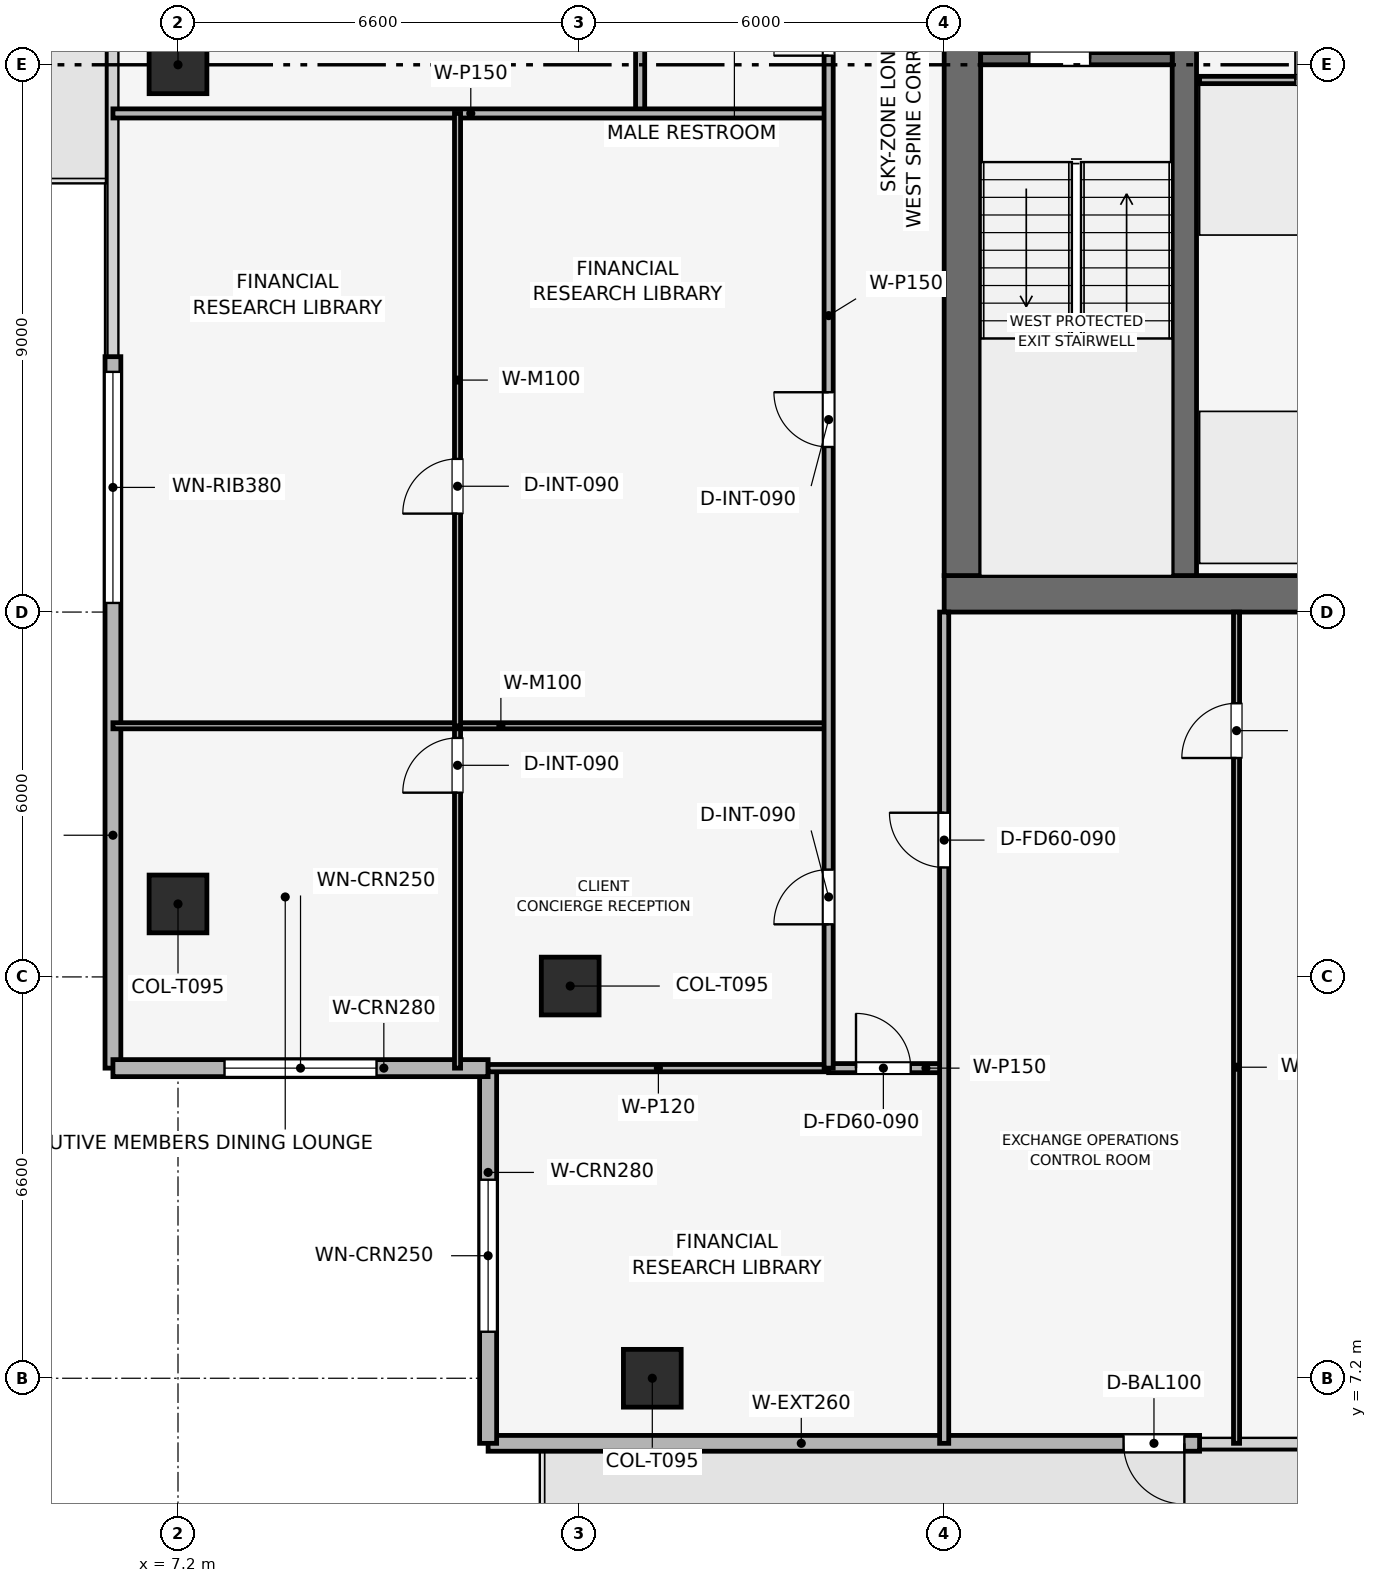
"""IFC4 building model, lengths in metres.
Left out: names, types, materials, properties, quantities, classifications, styles, units other than length and angle.
Written with IfcOpenShell. Run it as: python <this file> out.ifc"""

import sys

from ifc_helpers import new_model, si_unit, direction, frame, frame_2d, origin, origin_2d, place, context, subcontext, project, spatial, rectangle, extrude, element, fill, save


model = new_model("IFC4")
c1 = context("Model", 3, precision=1e-05, world=origin(), true_north=direction((0.0, 1.0)))
c2 = subcontext(c1, "Body", "Model", "MODEL_VIEW")
j1 = project(units=[si_unit("LENGTHUNIT", "METRE"), si_unit("PLANEANGLEUNIT", "RADIAN")], contexts=[c1])
p1 = place(None, origin())
s1 = spatial("IfcSite", under=j1, at=p1, CompositionType="ELEMENT")
p2 = place(p1, origin())
s2 = spatial("IfcBuilding", under=s1, at=p2, CompositionType="ELEMENT")
p3 = place(p2, frame((0.0, 0.0, 314.25)))
s3 = spatial("IfcBuildingStorey", under=s2, at=p3, CompositionType="ELEMENT", Elevation=314.25)
p4 = place(p3, frame((19.8, 20.1, 0.0), z_axis=(0.0, 0.0, 1.0), x_axis=(1.0, 0.0, 0.0)))
e1 = element("IfcWall", 1, at=p4, inside=s3, PredefinedType="SHEAR", context=c2, shape_type="SweptSolid", body=[
    extrude(rectangle(XDim=18.0, YDim=0.6, at=frame_2d((9.0, 0.0))), origin(), (0.0, 0.0, 1.0), 3.75),
])
p5 = place(p3, frame((20.1, 20.4, 0.0), z_axis=(0.0, 0.0, 1.0), x_axis=(0.0, 1.0, 0.0)))
e2 = element("IfcWall", 2, at=p5, inside=s3, PredefinedType="SHEAR", context=c2, shape_type="SweptSolid", body=[
    extrude(rectangle(XDim=16.8, YDim=0.6, at=frame_2d((8.4, 0.0))), origin(), (0.0, 0.0, 1.0), 3.75),
])
p6 = place(p5, frame((10.4, 0.0, 0.0)))
e3 = element("IfcOpeningElement", 3, at=p6, cuts=e2, PredefinedType="OPENING", context=c2, shape_type="SweptSolid", body=[
    extrude(rectangle(XDim=1.1, YDim=2.15, at=frame_2d((0.55, 1.075))), frame((0.0, 0.31, 0.0), z_axis=(0.0, -1.0, 0.0), x_axis=(1.0, 0.0, 0.0)), (0.0, 0.0, 1.0), 0.62),
])
p7 = place(p3, frame((23.75, 20.4, 0.0), z_axis=(0.0, 0.0, 1.0), x_axis=(0.0, 1.0, 0.0)))
e4 = element("IfcWall", 4, at=p7, inside=s3, PredefinedType="SHEAR", context=c2, shape_type="SweptSolid", body=[
    extrude(rectangle(XDim=16.8, YDim=0.4, at=frame_2d((8.4, 0.0))), origin(), (0.0, 0.0, 1.0), 3.75),
])
for number, where, z_axis, x_axis in (
    (5, (15.0, 7.2, 0.003), (0.0, 0.0, 1.0), (1.0, 0.0, 0.0)),
    (6, (7.2, 28.8, 0.003), (0.0, 0.0, 1.0), (1.0, 0.0, 0.0)),
    (7, (7.2, 15.0, 0.003), (0.0, 0.0, 1.0), (1.0, 0.0, 0.0)),
    (8, (13.65, 13.65, 0.003), (0.0, 0.0, 1.0), (1.0, 0.0, 0.0)),
):
    element("IfcColumn", number, at=place(p3, frame(where, z_axis=z_axis, x_axis=x_axis)), inside=s3, PredefinedType="COLUMN", context=c2, shape_type="SweptSolid", body=[
        extrude(rectangle(XDim=0.95, YDim=0.95, at=origin_2d()), origin(), (0.0, 0.0, 1.0), 3.504),
    ])
p8 = place(p3, frame((24.0, 6.13, 0.0), z_axis=(0.0, 0.0, 1.0), x_axis=(-1.0, 0.0, 0.0)))
e9 = element("IfcWall", 9, at=p8, inside=s3, PredefinedType="SOLIDWALL", context=c2, shape_type="SweptSolid", body=[
    extrude(rectangle(XDim=11.7, YDim=0.26, at=frame_2d((5.85, 0.0))), origin(), (0.0, 0.0, 1.0), 3.51),
])
p9 = place(p8, frame((0.25, 0.0, 0.0)))
e10 = element("IfcOpeningElement", 10, at=p9, cuts=e9, PredefinedType="OPENING", context=c2, shape_type="SweptSolid", body=[
    extrude(rectangle(XDim=1.0, YDim=2.2, at=frame_2d((0.5, 1.1))), frame((0.0, 0.14, 0.0), z_axis=(0.0, -1.0, 0.0), x_axis=(1.0, 0.0, 0.0)), (0.0, 0.0, 1.0), 0.28),
])
p10 = place(p3, frame((6.13, 12.3, 0.0), z_axis=(0.0, 0.0, 1.0), x_axis=(0.0, 1.0, 0.0)))
e11 = element("IfcWall", 11, at=p10, inside=s3, PredefinedType="SOLIDWALL", context=c2, shape_type="SweptSolid", body=[
    extrude(rectangle(XDim=11.7, YDim=0.26, at=frame_2d((5.85, 0.0))), origin(), (0.0, 0.0, 1.0), 3.51),
])
p11 = place(p10, frame((7.65, 0.0, 0.9)))
e12 = element("IfcOpeningElement", 12, at=p11, cuts=e11, PredefinedType="OPENING", context=c2, shape_type="SweptSolid", body=[
    extrude(rectangle(XDim=3.8, YDim=1.9, at=frame_2d((1.9, 0.95))), frame((0.0, 0.14, 0.0), z_axis=(0.0, -1.0, 0.0), x_axis=(1.0, 0.0, 0.0)), (0.0, 0.0, 1.0), 0.28),
])
p12 = place(p3, frame((12.3, 6.13, 0.0), z_axis=(0.0, 0.0, 1.0), x_axis=(0.0, 1.0, 0.0)))
e13 = element("IfcWall", 13, at=p12, inside=s3, PredefinedType="SOLIDWALL", context=c2, shape_type="SweptSolid", body=[
    extrude(rectangle(XDim=6.17, YDim=0.28, at=frame_2d((3.085, 0.0))), origin(), (0.0, 0.0, 1.0), 3.51),
])
p13 = place(p12, frame((1.835, 0.0, 0.9)))
e14 = element("IfcOpeningElement", 14, at=p13, cuts=e13, PredefinedType="OPENING", context=c2, shape_type="SweptSolid", body=[
    extrude(rectangle(XDim=2.5, YDim=1.9, at=frame_2d((1.25, 0.95))), frame((0.0, 0.15, 0.0), z_axis=(0.0, -1.0, 0.0), x_axis=(1.0, 0.0, 0.0)), (0.0, 0.0, 1.0), 0.3),
])
p14 = place(p3, frame((12.3, 12.3, 0.0), z_axis=(0.0, 0.0, 1.0), x_axis=(-1.0, 0.0, 0.0)))
e15 = element("IfcWall", 15, at=p14, inside=s3, PredefinedType="SOLIDWALL", context=c2, shape_type="SweptSolid", body=[
    extrude(rectangle(XDim=6.17, YDim=0.28, at=frame_2d((3.085, 0.0))), origin(), (0.0, 0.0, 1.0), 3.51),
])
p15 = place(p14, frame((1.835, 0.0, 0.9)))
e16 = element("IfcOpeningElement", 16, at=p15, cuts=e15, PredefinedType="OPENING", context=c2, shape_type="SweptSolid", body=[
    extrude(rectangle(XDim=2.5, YDim=1.9, at=frame_2d((1.25, 0.95))), frame((0.0, 0.15, 0.0), z_axis=(0.0, -1.0, 0.0), x_axis=(1.0, 0.0, 0.0)), (0.0, 0.0, 1.0), 0.3),
])
p16 = place(p3, frame((20.4, 28.9, 0.0), z_axis=(0.0, 0.0, 1.0), x_axis=(1.0, 0.0, 0.0)))
e17 = element("IfcWall", 17, at=p16, inside=s3, PredefinedType="SHEAR", context=c2, shape_type="SweptSolid", body=[
    extrude(rectangle(XDim=3.15, YDim=0.2, at=frame_2d((1.575, 0.0))), origin(), (0.0, 0.0, 1.0), 3.51),
])
p17 = place(p16, frame((0.8, 0.0, 0.0)))
e18 = element("IfcOpeningElement", 18, at=p17, cuts=e17, PredefinedType="OPENING", context=c2, shape_type="SweptSolid", body=[
    extrude(rectangle(XDim=1.0, YDim=2.1, at=frame_2d((0.5, 1.05))), frame((0.0, 0.11, 0.0), z_axis=(0.0, -1.0, 0.0), x_axis=(1.0, 0.0, 0.0)), (0.0, 0.0, 1.0), 0.22),
])
p18 = place(p3, frame((24.0, 28.55, 0.0), z_axis=(0.0, 0.0, 1.0), x_axis=(1.0, 0.0, 0.0)))
e19 = element("IfcWall", 19, at=p18, inside=s3, PredefinedType="PARTITIONING", context=c2, shape_type="SweptSolid", body=[
    extrude(rectangle(XDim=4.05, YDim=0.12, at=frame_2d((2.025, 0.0))), origin(), (0.0, 0.0, 1.0), 3.51),
])
p19 = place(p18, frame((1.575, 0.0, 0.0)))
e20 = element("IfcOpeningElement", 20, at=p19, cuts=e19, PredefinedType="OPENING", context=c2, shape_type="SweptSolid", body=[
    extrude(rectangle(XDim=0.9, YDim=2.1, at=frame_2d((0.45, 1.05))), frame((0.0, 0.07, 0.0), z_axis=(0.0, -1.0, 0.0), x_axis=(1.0, 0.0, 0.0)), (0.0, 0.0, 1.0), 0.14),
])
p20 = place(p3, frame((14.8, 28.0, 0.0), z_axis=(0.0, 0.0, 1.0), x_axis=(0.0, 1.0, 0.0)))
e21 = element("IfcWall", 21, at=p20, inside=s3, PredefinedType="PARTITIONING", context=c2, shape_type="SweptSolid", body=[
    extrude(rectangle(XDim=11.7, YDim=0.15, at=frame_2d((5.85, 0.0))), origin(), (0.0, 0.0, 1.0), 3.095),
])
p21 = place(p20, frame((9.6, 0.0, 0.0)))
e22 = element("IfcOpeningElement", 22, at=p21, cuts=e21, PredefinedType="OPENING", context=c2, shape_type="SweptSolid", body=[
    extrude(rectangle(XDim=0.9, YDim=2.1, at=frame_2d((0.45, 1.05))), frame((0.0, 0.085, 0.0), z_axis=(0.0, -1.0, 0.0), x_axis=(1.0, 0.0, 0.0)), (0.0, 0.0, 1.0), 0.17),
])
p22 = place(p3, frame((6.13, 28.0, 0.0), z_axis=(0.0, 0.0, 1.0), x_axis=(1.0, 0.0, 0.0)))
e23 = element("IfcWall", 23, at=p22, inside=s3, PredefinedType="PARTITIONING", context=c2, shape_type="SweptSolid", body=[
    extrude(rectangle(XDim=11.77, YDim=0.15, at=frame_2d((5.885, 0.0))), origin(), (0.0, 0.0, 1.0), 3.135),
])
p23 = place(p3, frame((11.797, 12.3, 0.0), z_axis=(0.0, 0.0, 1.0), x_axis=(0.0, 1.0, 0.0)))
e24 = element("IfcWall", 24, at=p23, inside=s3, PredefinedType="MOVABLE", context=c2, shape_type="SweptSolid", body=[
    extrude(rectangle(XDim=5.63, YDim=0.1, at=frame_2d((2.815, 0.0))), origin(), (0.0, 0.0, 1.0), 3.195),
])
p24 = place(p23, frame((4.53, 0.0, 0.0)))
e25 = element("IfcOpeningElement", 25, at=p24, cuts=e24, PredefinedType="OPENING", context=c2, shape_type="SweptSolid", body=[
    extrude(rectangle(XDim=0.9, YDim=2.1, at=frame_2d((0.45, 1.05))), frame((0.0, 0.06, 0.0), z_axis=(0.0, -1.0, 0.0), x_axis=(1.0, 0.0, 0.0)), (0.0, 0.0, 1.0), 0.12),
])
p25 = place(p3, frame((6.13, 17.93, 0.0), z_axis=(0.0, 0.0, 1.0), x_axis=(1.0, 0.0, 0.0)))
e26 = element("IfcWall", 26, at=p25, inside=s3, PredefinedType="MOVABLE", context=c2, shape_type="SweptSolid", body=[
    extrude(rectangle(XDim=11.77, YDim=0.1, at=frame_2d((5.885, 0.0))), origin(), (0.0, 0.0, 1.0), 3.095),
])
p26 = place(p3, frame((11.797, 17.93, 0.0), z_axis=(0.0, 0.0, 1.0), x_axis=(0.0, 1.0, 0.0)))
e27 = element("IfcWall", 27, at=p26, inside=s3, PredefinedType="MOVABLE", context=c2, shape_type="SweptSolid", body=[
    extrude(rectangle(XDim=10.07, YDim=0.1, at=frame_2d((5.035, 0.0))), origin(), (0.0, 0.0, 1.0), 3.095),
])
p27 = place(p26, frame((3.489, 0.0, 0.0)))
e28 = element("IfcOpeningElement", 28, at=p27, cuts=e27, PredefinedType="OPENING", context=c2, shape_type="SweptSolid", body=[
    extrude(rectangle(XDim=0.9, YDim=2.1, at=frame_2d((0.45, 1.05))), frame((0.0, 0.06, 0.0), z_axis=(0.0, -1.0, 0.0), x_axis=(1.0, 0.0, 0.0)), (0.0, 0.0, 1.0), 0.12),
])
p28 = place(p3, frame((12.3, 12.3, 0.0), z_axis=(0.0, 0.0, 1.0), x_axis=(1.0, 0.0, 0.0)))
e29 = element("IfcWall", 29, at=p28, inside=s3, PredefinedType="PARTITIONING", context=c2, shape_type="SweptSolid", body=[
    extrude(rectangle(XDim=5.6, YDim=0.12, at=frame_2d((2.8, 0.0))), origin(), (0.0, 0.0, 1.0), 3.195),
])
p29 = place(p3, frame((17.9, 12.3, 0.0), z_axis=(0.0, 0.0, 1.0), x_axis=(1.0, 0.0, 0.0)))
e30 = element("IfcWall", 30, at=p29, inside=s3, PredefinedType="PARTITIONING", context=c2, shape_type="SweptSolid", body=[
    extrude(rectangle(XDim=1.9, YDim=0.15, at=frame_2d((0.95, 0.0))), origin(), (0.0, 0.0, 1.0), 3.51),
])
p30 = place(p29, frame((0.45, 0.0, 0.0)))
e31 = element("IfcOpeningElement", 31, at=p30, cuts=e30, PredefinedType="OPENING", context=c2, shape_type="SweptSolid", body=[
    extrude(rectangle(XDim=0.9, YDim=2.1, at=frame_2d((0.45, 1.05))), frame((0.0, 0.085, 0.0), z_axis=(0.0, -1.0, 0.0), x_axis=(1.0, 0.0, 0.0)), (0.0, 0.0, 1.0), 0.17),
])
p31 = place(p3, frame((19.8, 6.13, 0.0), z_axis=(0.0, 0.0, 1.0), x_axis=(0.0, 1.0, 0.0)))
e32 = element("IfcWall", 32, at=p31, inside=s3, PredefinedType="PARTITIONING", context=c2, shape_type="SweptSolid", body=[
    extrude(rectangle(XDim=13.67, YDim=0.15, at=frame_2d((6.835, 0.0))), origin(), (0.0, 0.0, 1.0), 3.095),
])
p32 = place(p31, frame((9.47, 0.0, 0.0)))
e33 = element("IfcOpeningElement", 33, at=p32, cuts=e32, PredefinedType="OPENING", context=c2, shape_type="SweptSolid", body=[
    extrude(rectangle(XDim=0.9, YDim=2.1, at=frame_2d((0.45, 1.05))), frame((0.0, 0.085, 0.0), z_axis=(0.0, -1.0, 0.0), x_axis=(1.0, 0.0, 0.0)), (0.0, 0.0, 1.0), 0.17),
])
p33 = place(p3, frame((24.608, 6.13, 0.0), z_axis=(0.0, 0.0, 1.0), x_axis=(0.0, 1.0, 0.0)))
e34 = element("IfcWall", 34, at=p33, inside=s3, PredefinedType="MOVABLE", context=c2, shape_type="SweptSolid", body=[
    extrude(rectangle(XDim=13.67, YDim=0.1, at=frame_2d((6.835, 0.0))), origin(), (0.0, 0.0, 1.0), 3.135),
])
p34 = place(p33, frame((11.27, 0.0, 0.0)))
e35 = element("IfcOpeningElement", 35, at=p34, cuts=e34, PredefinedType="OPENING", context=c2, shape_type="SweptSolid", body=[
    extrude(rectangle(XDim=0.9, YDim=2.1, at=frame_2d((0.45, 1.05))), frame((0.0, 0.06, 0.0), z_axis=(0.0, -1.0, 0.0), x_axis=(1.0, 0.0, 0.0)), (0.0, 0.0, 1.0), 0.12),
])
p35 = place(p3, frame((17.9, 12.3, 0.0), z_axis=(0.0, 0.0, 1.0), x_axis=(0.0, 1.0, 0.0)))
e36 = element("IfcWall", 36, at=p35, inside=s3, PredefinedType="PARTITIONING", context=c2, shape_type="SweptSolid", body=[
    extrude(rectangle(XDim=27.4, YDim=0.15, at=frame_2d((13.7, 0.0))), origin(), (0.0, 0.0, 1.0), 3.095),
])
p36 = place(p35, frame((2.365, 0.0, 0.0)))
e37 = element("IfcOpeningElement", 37, at=p36, cuts=e36, PredefinedType="OPENING", context=c2, shape_type="SweptSolid", body=[
    extrude(rectangle(XDim=0.9, YDim=2.1, at=frame_2d((0.45, 1.05))), frame((0.0, 0.085, 0.0), z_axis=(0.0, -1.0, 0.0), x_axis=(1.0, 0.0, 0.0)), (0.0, 0.0, 1.0), 0.17),
])
p37 = place(p35, frame((10.215, 0.0, 0.0)))
e38 = element("IfcOpeningElement", 38, at=p37, cuts=e36, PredefinedType="OPENING", context=c2, shape_type="SweptSolid", body=[
    extrude(rectangle(XDim=0.9, YDim=2.1, at=frame_2d((0.45, 1.05))), frame((0.0, 0.085, 0.0), z_axis=(0.0, -1.0, 0.0), x_axis=(1.0, 0.0, 0.0)), (0.0, 0.0, 1.0), 0.17),
])
p38 = place(p35, frame((16.65, 0.0, 0.0)))
e39 = element("IfcOpeningElement", 39, at=p38, cuts=e36, PredefinedType="OPENING", context=c2, shape_type="SweptSolid", body=[
    extrude(rectangle(XDim=0.9, YDim=2.1, at=frame_2d((0.45, 1.05))), frame((0.0, 0.085, 0.0), z_axis=(0.0, -1.0, 0.0), x_axis=(1.0, 0.0, 0.0)), (0.0, 0.0, 1.0), 0.17),
])
p39 = place(p35, frame((19.55, 0.0, 0.0)))
e40 = element("IfcOpeningElement", 40, at=p39, cuts=e36, PredefinedType="OPENING", context=c2, shape_type="SweptSolid", body=[
    extrude(rectangle(XDim=0.9, YDim=2.1, at=frame_2d((0.45, 1.05))), frame((0.0, 0.085, 0.0), z_axis=(0.0, -1.0, 0.0), x_axis=(1.0, 0.0, 0.0)), (0.0, 0.0, 1.0), 0.17),
])
p40 = place(p35, frame((22.3, 0.0, 0.0)))
e41 = element("IfcOpeningElement", 41, at=p40, cuts=e36, PredefinedType="OPENING", context=c2, shape_type="SweptSolid", body=[
    extrude(rectangle(XDim=0.95, YDim=2.1, at=frame_2d((0.475, 1.05))), frame((0.0, 0.085, 0.0), z_axis=(0.0, -1.0, 0.0), x_axis=(1.0, 0.0, 0.0)), (0.0, 0.0, 1.0), 0.17),
])
p41 = place(p35, frame((25.3, 0.0, 0.0)))
e42 = element("IfcOpeningElement", 42, at=p41, cuts=e36, PredefinedType="OPENING", context=c2, shape_type="SweptSolid", body=[
    extrude(rectangle(XDim=0.9, YDim=2.1, at=frame_2d((0.45, 1.05))), frame((0.0, 0.085, 0.0), z_axis=(0.0, -1.0, 0.0), x_axis=(1.0, 0.0, 0.0)), (0.0, 0.0, 1.0), 0.17),
])
p42 = place(p9, origin())
e43 = element("IfcDoor", 43, at=p42, inside=s3, OperationType="SINGLE_SWING_LEFT", PredefinedType="DOOR", context=c2, shape_type="SweptSolid", body=[
    extrude(rectangle(XDim=1.0, YDim=2.2, at=frame_2d((0.5, 1.1))), frame((0.0, 0.025, 0.0), z_axis=(0.0, -1.0, 0.0), x_axis=(1.0, 0.0, 0.0)), (0.0, 0.0, 1.0), 0.05),
])
fill(e10, e43)
p43 = place(p11, origin())
e44 = element("IfcWindow", 44, at=p43, inside=s3, PartitioningType="SINGLE_PANEL", PredefinedType="WINDOW", context=c2, shape_type="SweptSolid", body=[
    extrude(rectangle(XDim=3.8, YDim=1.9, at=frame_2d((1.9, 0.95))), frame((0.0, 0.03, 0.0), z_axis=(0.0, -1.0, 0.0), x_axis=(1.0, 0.0, 0.0)), (0.0, 0.0, 1.0), 0.06),
])
fill(e12, e44)
p44 = place(p13, origin())
e45 = element("IfcWindow", 45, at=p44, inside=s3, PartitioningType="SINGLE_PANEL", PredefinedType="WINDOW", context=c2, shape_type="SweptSolid", body=[
    extrude(rectangle(XDim=2.5, YDim=1.9, at=frame_2d((1.25, 0.95))), frame((0.0, 0.03, 0.0), z_axis=(0.0, -1.0, 0.0), x_axis=(1.0, 0.0, 0.0)), (0.0, 0.0, 1.0), 0.06),
])
fill(e14, e45)
p45 = place(p15, origin())
e46 = element("IfcWindow", 46, at=p45, inside=s3, PartitioningType="SINGLE_PANEL", PredefinedType="WINDOW", context=c2, shape_type="SweptSolid", body=[
    extrude(rectangle(XDim=2.5, YDim=1.9, at=frame_2d((1.25, 0.95))), frame((0.0, 0.03, 0.0), z_axis=(0.0, -1.0, 0.0), x_axis=(1.0, 0.0, 0.0)), (0.0, 0.0, 1.0), 0.06),
])
fill(e16, e46)
p46 = place(p17, origin())
e47 = element("IfcDoor", 47, at=p46, inside=s3, OperationType="SINGLE_SWING_RIGHT", PredefinedType="DOOR", context=c2, shape_type="SweptSolid", body=[
    extrude(rectangle(XDim=1.0, YDim=2.1, at=frame_2d((0.5, 1.05))), frame((0.0, 0.025, 0.0), z_axis=(0.0, -1.0, 0.0), x_axis=(1.0, 0.0, 0.0)), (0.0, 0.0, 1.0), 0.05),
])
fill(e18, e47)
p47 = place(p19, origin())
e48 = element("IfcDoor", 48, at=p47, inside=s3, OperationType="SINGLE_SWING_LEFT", PredefinedType="DOOR", context=c2, shape_type="SweptSolid", body=[
    extrude(rectangle(XDim=0.9, YDim=2.1, at=frame_2d((0.45, 1.05))), frame((0.0, 0.025, 0.0), z_axis=(0.0, -1.0, 0.0), x_axis=(1.0, 0.0, 0.0)), (0.0, 0.0, 1.0), 0.05),
])
fill(e20, e48)
p48 = place(p24, origin())
e49 = element("IfcDoor", 49, at=p48, inside=s3, OperationType="SINGLE_SWING_LEFT", PredefinedType="DOOR", context=c2, shape_type="SweptSolid", body=[
    extrude(rectangle(XDim=0.9, YDim=2.1, at=frame_2d((0.45, 1.05))), frame((0.0, 0.025, 0.0), z_axis=(0.0, -1.0, 0.0), x_axis=(1.0, 0.0, 0.0)), (0.0, 0.0, 1.0), 0.05),
])
fill(e25, e49)
p49 = place(p27, origin())
e50 = element("IfcDoor", 50, at=p49, inside=s3, OperationType="SINGLE_SWING_LEFT", PredefinedType="DOOR", context=c2, shape_type="SweptSolid", body=[
    extrude(rectangle(XDim=0.9, YDim=2.1, at=frame_2d((0.45, 1.05))), frame((0.0, 0.025, 0.0), z_axis=(0.0, -1.0, 0.0), x_axis=(1.0, 0.0, 0.0)), (0.0, 0.0, 1.0), 0.05),
])
fill(e28, e50)
p50 = place(p30, origin())
e51 = element("IfcDoor", 51, at=p50, inside=s3, OperationType="SINGLE_SWING_LEFT", PredefinedType="DOOR", context=c2, shape_type="SweptSolid", body=[
    extrude(rectangle(XDim=0.9, YDim=2.1, at=frame_2d((0.45, 1.05))), frame((0.0, 0.025, 0.0), z_axis=(0.0, -1.0, 0.0), x_axis=(1.0, 0.0, 0.0)), (0.0, 0.0, 1.0), 0.05),
])
fill(e31, e51)
p51 = place(p32, origin())
e52 = element("IfcDoor", 52, at=p51, inside=s3, OperationType="SINGLE_SWING_RIGHT", PredefinedType="DOOR", context=c2, shape_type="SweptSolid", body=[
    extrude(rectangle(XDim=0.9, YDim=2.1, at=frame_2d((0.45, 1.05))), frame((0.0, 0.025, 0.0), z_axis=(0.0, -1.0, 0.0), x_axis=(1.0, 0.0, 0.0)), (0.0, 0.0, 1.0), 0.05),
])
fill(e33, e52)
p52 = place(p34, origin())
e53 = element("IfcDoor", 53, at=p52, inside=s3, OperationType="SINGLE_SWING_LEFT", PredefinedType="DOOR", context=c2, shape_type="SweptSolid", body=[
    extrude(rectangle(XDim=0.9, YDim=2.1, at=frame_2d((0.45, 1.05))), frame((0.0, 0.025, 0.0), z_axis=(0.0, -1.0, 0.0), x_axis=(1.0, 0.0, 0.0)), (0.0, 0.0, 1.0), 0.05),
])
fill(e35, e53)
p53 = place(p36, origin())
e54 = element("IfcDoor", 54, at=p53, inside=s3, OperationType="SINGLE_SWING_LEFT", PredefinedType="DOOR", context=c2, shape_type="SweptSolid", body=[
    extrude(rectangle(XDim=0.9, YDim=2.1, at=frame_2d((0.45, 1.05))), frame((0.0, 0.025, 0.0), z_axis=(0.0, -1.0, 0.0), x_axis=(1.0, 0.0, 0.0)), (0.0, 0.0, 1.0), 0.05),
])
fill(e37, e54)
p54 = place(p37, origin())
e55 = element("IfcDoor", 55, at=p54, inside=s3, OperationType="SINGLE_SWING_RIGHT", PredefinedType="DOOR", context=c2, shape_type="SweptSolid", body=[
    extrude(rectangle(XDim=0.9, YDim=2.1, at=frame_2d((0.45, 1.05))), frame((0.0, 0.025, 0.0), z_axis=(0.0, -1.0, 0.0), x_axis=(1.0, 0.0, 0.0)), (0.0, 0.0, 1.0), 0.05),
])
fill(e38, e55)
p55 = place(p38, origin())
e56 = element("IfcDoor", 56, at=p55, inside=s3, OperationType="SINGLE_SWING_LEFT", PredefinedType="DOOR", context=c2, shape_type="SweptSolid", body=[
    extrude(rectangle(XDim=0.9, YDim=2.1, at=frame_2d((0.45, 1.05))), frame((0.0, 0.025, 0.0), z_axis=(0.0, -1.0, 0.0), x_axis=(1.0, 0.0, 0.0)), (0.0, 0.0, 1.0), 0.05),
])
fill(e39, e56)
save(model, sys.argv[1])
